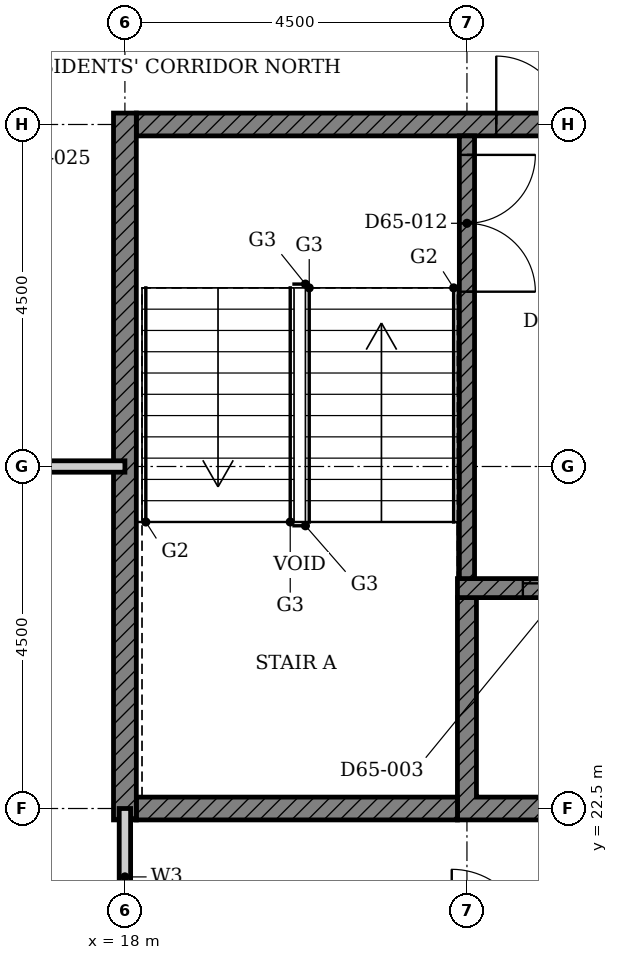
"""IFC4 building model, lengths in metres.
Left out: names, types, materials, properties, quantities, classifications, styles, units other than length and angle.
Written with IfcOpenShell. Run it as: python <this file> out.ifc"""

import sys

from ifc_helpers import new_model, si_unit, direction, frame, frame_2d, origin, place, context, subcontext, project, spatial, polyline, rectangle, outline, extrude, element, fill, save


model = new_model("IFC4")
c1 = context("Model", 3, precision=1e-05, world=origin(), true_north=direction((0.0, 1.0)))
c2 = subcontext(c1, "Body", "Model", "MODEL_VIEW")
j1 = project(units=[si_unit("LENGTHUNIT", "METRE"), si_unit("PLANEANGLEUNIT", "RADIAN")], contexts=[c1])
p1 = place(None, origin())
s1 = spatial("IfcSite", under=j1, at=p1, CompositionType="ELEMENT")
p2 = place(p1, origin())
s2 = spatial("IfcBuilding", under=s1, at=p2, CompositionType="ELEMENT")
p3 = place(p2, frame((0.0, 0.0, 256.4)))
s3 = spatial("IfcBuildingStorey", under=s2, at=p3, CompositionType="ELEMENT", Elevation=256.4)
p4 = place(p3, origin())
e1 = element("IfcWall", 1, at=p4, inside=s3, PredefinedType="SHEAR", context=c2, shape_type="SweptSolid", body=[
    extrude(outline(polyline([(22.375, 22.35), (25.197, 22.35), (25.197, 25.275), (24.947, 25.275), (24.947, 22.65), (22.625, 22.65), (22.625, 25.275), (22.375, 25.275), (22.375, 22.35)])), origin(), (0.0, 0.0, 1.0), 3.4),
])
p5 = place(p3, frame((18.15, 22.5, 0.0), z_axis=(0.0, 0.0, 1.0), x_axis=(1.0, 0.0, 0.0)))
e2 = element("IfcWall", 2, at=p5, inside=s3, PredefinedType="SHEAR", context=c2, shape_type="SweptSolid", body=[
    extrude(rectangle(XDim=4.225, YDim=0.3, at=frame_2d((2.113, 0.0))), origin(), (0.0, 0.0, 1.0), 3.4),
])
p6 = place(p3, frame((18.15, 31.5, 0.0), z_axis=(0.0, 0.0, 1.0), x_axis=(1.0, 0.0, 0.0)))
e3 = element("IfcWall", 3, at=p6, inside=s3, PredefinedType="SHEAR", context=c2, shape_type="SweptSolid", body=[
    extrude(rectangle(XDim=9.368, YDim=0.3, at=frame_2d((4.684, 0.0))), origin(), (0.0, 0.0, 1.0), 3.4),
])
p7 = place(p6, frame((4.736, 0.0, 0.0)))
e4 = element("IfcOpeningElement", 4, at=p7, cuts=e3, PredefinedType="OPENING", context=c2, shape_type="SweptSolid", body=[
    extrude(rectangle(XDim=1.8, YDim=2.1, at=frame_2d((0.9, 1.05))), frame((0.0, 0.16, 0.0), z_axis=(0.0, -1.0, 0.0), x_axis=(1.0, 0.0, 0.0)), (0.0, 0.0, 1.0), 0.32),
])
p8 = place(p3, frame((18.0, 22.35, 0.0), z_axis=(0.0, 0.0, 1.0), x_axis=(0.0, 1.0, 0.0)))
e5 = element("IfcWall", 5, at=p8, inside=s3, PredefinedType="SHEAR", context=c2, shape_type="SweptSolid", body=[
    extrude(rectangle(XDim=9.3, YDim=0.3, at=frame_2d((4.65, 0.0))), origin(), (0.0, 0.0, 1.0), 3.4),
])
p9 = place(p3, frame((22.375, 25.4, 0.0), z_axis=(0.0, 0.0, 1.0), x_axis=(1.0, 0.0, 0.0)))
e6 = element("IfcWall", 6, at=p9, inside=s3, PredefinedType="SHEAR", context=c2, shape_type="SweptSolid", body=[
    extrude(rectangle(XDim=15.678, YDim=0.25, at=frame_2d((7.839, 0.0))), origin(), (0.0, 0.0, 1.0), 3.4),
])
p10 = place(p9, frame((6.004, 0.0, 0.0)))
e7 = element("IfcOpeningElement", 7, at=p10, cuts=e6, PredefinedType="OPENING", context=c2, shape_type="SweptSolid", body=[
    extrude(rectangle(XDim=1.1, YDim=2.1, at=frame_2d((0.55, 1.05))), frame((0.0, 0.135, 0.0), z_axis=(0.0, -1.0, 0.0), x_axis=(1.0, 0.0, 0.0)), (0.0, 0.0, 1.0), 0.27),
])
p11 = place(p9, frame((0.861, 0.0, 0.0)))
e8 = element("IfcOpeningElement", 8, at=p11, cuts=e6, PredefinedType="OPENING", context=c2, shape_type="SweptSolid", body=[
    extrude(rectangle(XDim=1.1, YDim=2.1, at=frame_2d((0.55, 1.05))), frame((0.0, 0.135, 0.0), z_axis=(0.0, -1.0, 0.0), x_axis=(1.0, 0.0, 0.0)), (0.0, 0.0, 1.0), 0.27),
])
p12 = place(p9, frame((3.532, 0.0, 0.0)))
e9 = element("IfcOpeningElement", 9, at=p12, cuts=e6, PredefinedType="OPENING", context=c2, shape_type="SweptSolid", body=[
    extrude(rectangle(XDim=0.9, YDim=2.1, at=frame_2d((0.45, 1.05))), frame((0.0, 0.135, 0.0), z_axis=(0.0, -1.0, 0.0), x_axis=(1.0, 0.0, 0.0)), (0.0, 0.0, 1.0), 0.27),
])
p13 = place(p9, frame((9.961, 0.0, 0.0)))
e10 = element("IfcOpeningElement", 10, at=p13, cuts=e6, PredefinedType="OPENING", context=c2, shape_type="SweptSolid", body=[
    extrude(rectangle(XDim=0.9, YDim=2.1, at=frame_2d((0.45, 1.05))), frame((0.0, 0.135, 0.0), z_axis=(0.0, -1.0, 0.0), x_axis=(1.0, 0.0, 0.0)), (0.0, 0.0, 1.0), 0.27),
])
p14 = place(p9, frame((13.818, 0.0, 0.0)))
e11 = element("IfcOpeningElement", 11, at=p14, cuts=e6, PredefinedType="OPENING", context=c2, shape_type="SweptSolid", body=[
    extrude(rectangle(XDim=0.9, YDim=2.1, at=frame_2d((0.45, 1.05))), frame((0.0, 0.135, 0.0), z_axis=(0.0, -1.0, 0.0), x_axis=(1.0, 0.0, 0.0)), (0.0, 0.0, 1.0), 0.27),
])
p15 = place(p3, frame((22.5, 31.35, 0.0), z_axis=(0.0, 0.0, 1.0), x_axis=(0.0, -1.0, 0.0)))
e12 = element("IfcWall", 12, at=p15, inside=s3, PredefinedType="SHEAR", context=c2, shape_type="SweptSolid", body=[
    extrude(rectangle(XDim=5.825, YDim=0.2, at=frame_2d((2.913, 0.0))), origin(), (0.0, 0.0, 1.0), 3.4),
])
p16 = place(p15, frame((0.25, 0.0, 0.0)))
e13 = element("IfcOpeningElement", 13, at=p16, cuts=e12, PredefinedType="OPENING", context=c2, shape_type="SweptSolid", body=[
    extrude(rectangle(XDim=1.8, YDim=2.1, at=frame_2d((0.9, 1.05))), frame((0.0, 0.11, 0.0), z_axis=(0.0, -1.0, 0.0), x_axis=(1.0, 0.0, 0.0)), (0.0, 0.0, 1.0), 0.22),
])
p17 = place(p3, frame((4.5, 27.0, 0.0), z_axis=(0.0, 0.0, 1.0), x_axis=(1.0, 0.0, 0.0)))
e14 = element("IfcWall", 14, at=p17, inside=s3, PredefinedType="PARTITIONING", context=c2, shape_type="SweptSolid", body=[
    extrude(rectangle(XDim=13.5, YDim=0.15, at=frame_2d((6.75, 0.0))), origin(), (0.0, 0.0, 1.0), 2.68),
])
p18 = place(p17, frame((5.35, 0.0, 0.0)))
e15 = element("IfcOpeningElement", 15, at=p18, cuts=e14, PredefinedType="OPENING", context=c2, shape_type="SweptSolid", body=[
    extrude(rectangle(XDim=1.0, YDim=2.1, at=frame_2d((0.5, 1.05))), frame((0.0, 0.085, 0.0), z_axis=(0.0, -1.0, 0.0), x_axis=(1.0, 0.0, 0.0)), (0.0, 0.0, 1.0), 0.17),
])
p19 = place(p3, frame((18.0, 20.7, 0.0), z_axis=(0.0, 0.0, 1.0), x_axis=(0.0, 1.0, 0.0)))
e16 = element("IfcWall", 16, at=p19, inside=s3, PredefinedType="PARTITIONING", context=c2, shape_type="SweptSolid", body=[
    extrude(rectangle(XDim=1.8, YDim=0.15, at=frame_2d((0.9, 0.0))), origin(), (0.0, 0.0, 1.0), 3.4),
])
p20 = place(p11, origin())
e17 = element("IfcDoor", 17, at=p20, inside=s3, OperationType="DOUBLE_DOOR_SLIDING", PredefinedType="DOOR", context=c2, shape_type="SweptSolid", body=[
    extrude(rectangle(XDim=1.1, YDim=2.1, at=frame_2d((0.55, 1.05))), frame((0.0, 0.025, 0.0), z_axis=(0.0, -1.0, 0.0), x_axis=(1.0, 0.0, 0.0)), (0.0, 0.0, 1.0), 0.05),
])
fill(e8, e17)
p21 = place(p16, origin())
e18 = element("IfcDoor", 18, at=p21, inside=s3, OperationType="DOUBLE_DOOR_SINGLE_SWING", PredefinedType="DOOR", context=c2, shape_type="SweptSolid", body=[
    extrude(rectangle(XDim=1.8, YDim=2.1, at=frame_2d((0.9, 1.05))), frame((0.0, 0.025, 0.0), z_axis=(0.0, -1.0, 0.0), x_axis=(1.0, 0.0, 0.0)), (0.0, 0.0, 1.0), 0.05),
])
fill(e13, e18)
p22 = place(p7, origin())
e19 = element("IfcDoor", 19, at=p22, inside=s3, OperationType="DOUBLE_DOOR_SINGLE_SWING", PredefinedType="DOOR", context=c2, shape_type="SweptSolid", body=[
    extrude(rectangle(XDim=1.8, YDim=2.1, at=frame_2d((0.9, 1.05))), frame((0.0, 0.025, 0.0), z_axis=(0.0, -1.0, 0.0), x_axis=(1.0, 0.0, 0.0)), (0.0, 0.0, 1.0), 0.05),
])
fill(e4, e19)
save(model, sys.argv[1])
